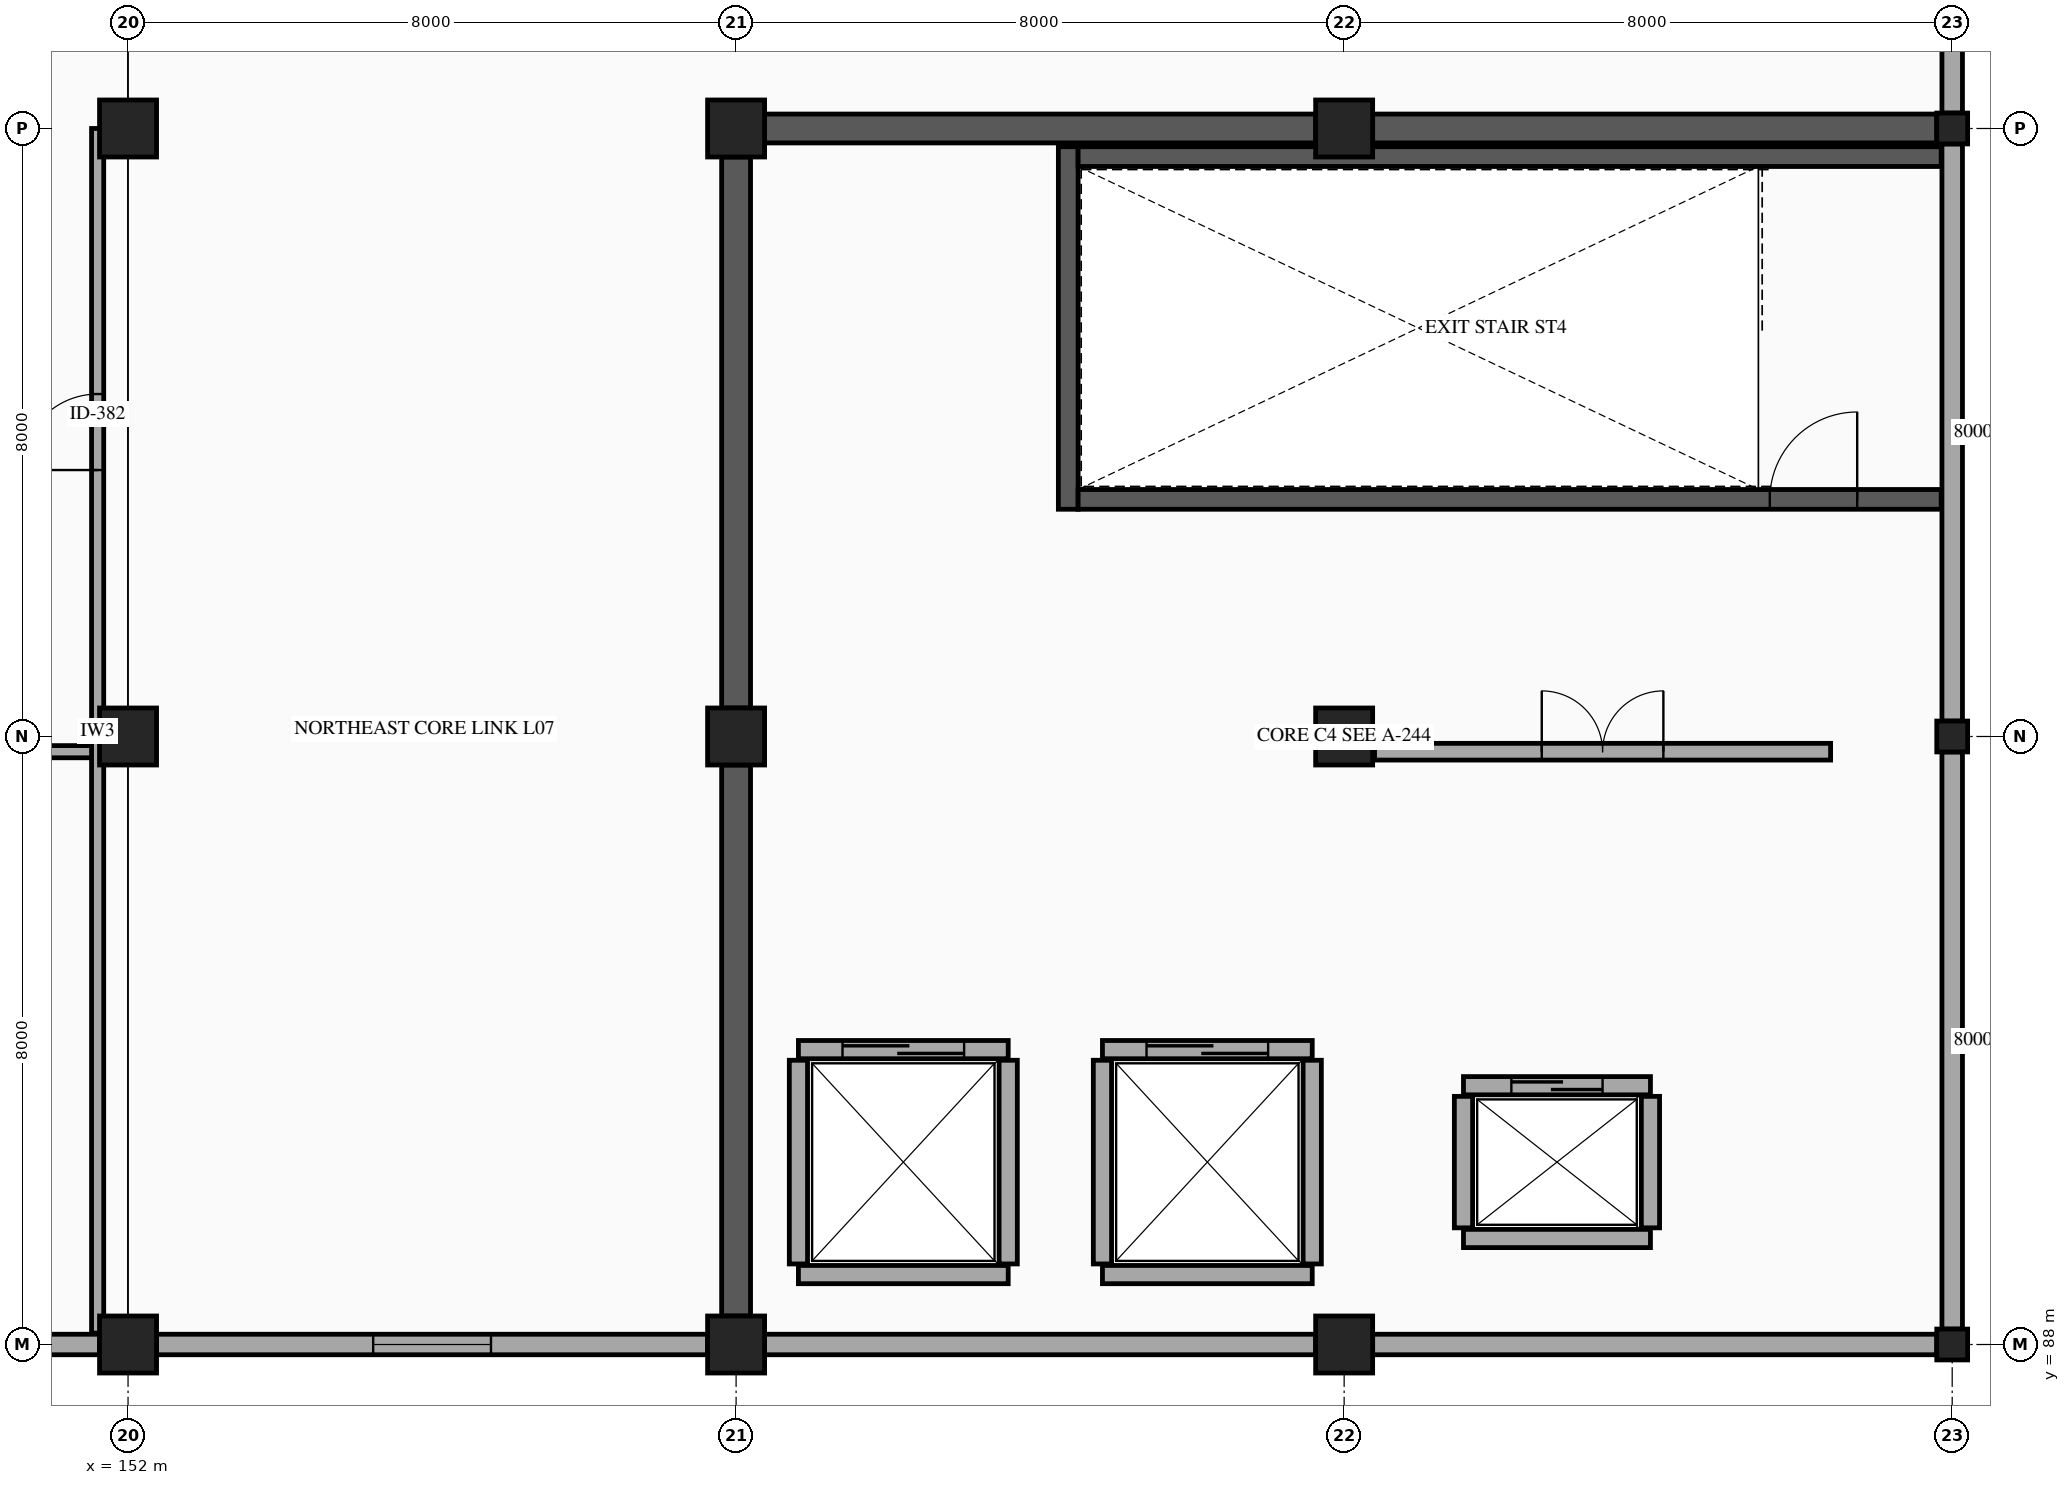
"""IFC4 building model, lengths in metres.
Left out: names, types, materials, properties, quantities, classifications, styles, units other than length and angle.
Written with IfcOpenShell. Run it as: python <this file> out.ifc"""

import sys

from ifc_helpers import new_model, si_unit, direction, frame, frame_2d, origin, origin_2d, place, context, subcontext, project, spatial, rectangle, hollow_rectangle, extrude, element, fill, save


model = new_model("IFC4")
c1 = context("Model", 3, precision=1e-05, world=origin(), true_north=direction((0.0, 1.0)))
c2 = subcontext(c1, "Body", "Model", "MODEL_VIEW")
j1 = project(units=[si_unit("LENGTHUNIT", "METRE"), si_unit("PLANEANGLEUNIT", "RADIAN")], contexts=[c1])
p1 = place(None, origin())
s1 = spatial("IfcSite", under=j1, at=p1, CompositionType="ELEMENT")
p2 = place(p1, origin())
s2 = spatial("IfcBuilding", under=s1, at=p2, CompositionType="ELEMENT")
p3 = place(p2, frame((0.0, 0.0, 32.9)))
s3 = spatial("IfcBuildingStorey", under=s2, at=p3, CompositionType="ELEMENT", Elevation=32.9)
for number, where, z_axis, x_axis in (
    (1, (152.0, 88.0, 0.0), (0.0, 0.0, 1.0), (1.0, 0.0, 0.0)),
    (2, (152.0, 96.0, 0.0), (0.0, 0.0, 1.0), (1.0, 0.0, 0.0)),
    (3, (152.0, 104.0, 0.0), (0.0, 0.0, 1.0), (1.0, 0.0, 0.0)),
    (4, (160.0, 88.0, 0.0), (0.0, 0.0, 1.0), (1.0, 0.0, 0.0)),
    (5, (160.0, 96.0, 0.0), (0.0, 0.0, 1.0), (1.0, 0.0, 0.0)),
    (6, (160.0, 104.0, 0.0), (0.0, 0.0, 1.0), (1.0, 0.0, 0.0)),
    (7, (168.0, 88.0, 0.0), (0.0, 0.0, 1.0), (1.0, 0.0, 0.0)),
    (8, (168.0, 96.0, 0.0), (0.0, 0.0, 1.0), (1.0, 0.0, 0.0)),
    (9, (168.0, 104.0, 0.0), (0.0, 0.0, 1.0), (1.0, 0.0, 0.0)),
):
    element("IfcColumn", number, at=place(p3, frame(where, z_axis=z_axis, x_axis=x_axis)), inside=s3, PredefinedType="COLUMN", context=c2, shape_type="SweptSolid", body=[
        extrude(rectangle(XDim=0.75, YDim=0.75, at=origin_2d()), origin(), (0.0, 0.0, 1.0), 4.6),
    ])
for number, where, z_axis, x_axis in (
    (10, (176.0, 88.0, 0.0), (0.0, 0.0, 1.0), (1.0, 0.0, 0.0)),
    (11, (176.0, 96.0, 0.0), (0.0, 0.0, 1.0), (1.0, 0.0, 0.0)),
    (12, (176.0, 104.0, 0.0), (0.0, 0.0, 1.0), (1.0, 0.0, 0.0)),
):
    element("IfcColumn", number, at=place(p3, frame(where, z_axis=z_axis, x_axis=x_axis)), inside=s3, PredefinedType="COLUMN", context=c2, shape_type="SweptSolid", body=[
        extrude(hollow_rectangle(XDim=0.406, YDim=0.406, WallThickness=0.015, InnerFilletRadius=0.015, OuterFilletRadius=0.029, at=origin_2d()), origin(), (0.0, 0.0, 1.0), 4.6),
    ])
for number, where, z_axis, x_axis in (
    (13, (176.0, 111.797, 0.0), (0.0, 0.0, 1.0), (0.0, -1.0, 0.0)),
    (14, (176.0, 103.797, 0.0), (0.0, 0.0, 1.0), (0.0, -1.0, 0.0)),
    (15, (176.0, 95.797, 0.0), (0.0, 0.0, 1.0), (0.0, -1.0, 0.0)),
):
    element("IfcWall", number, at=place(p3, frame(where, z_axis=z_axis, x_axis=x_axis)), inside=s3, PredefinedType="STANDARD", context=c2, shape_type="SweptSolid", body=[
        extrude(rectangle(XDim=7.594, YDim=0.27, at=frame_2d((3.797, 0.0))), origin(), (0.0, 0.0, 1.0), 3.58),
    ])
p4 = place(p3, frame((175.797, 88.0, 0.0), z_axis=(0.0, 0.0, 1.0), x_axis=(-1.0, 0.0, 0.0)))
e16 = element("IfcWall", 16, at=p4, inside=s3, PredefinedType="STANDARD", context=c2, shape_type="SweptSolid", body=[
    extrude(rectangle(XDim=7.422, YDim=0.27, at=frame_2d((3.711, 0.0))), origin(), (0.0, 0.0, 1.0), 3.58),
])
p5 = place(p3, frame((167.625, 88.0, 0.0), z_axis=(0.0, 0.0, 1.0), x_axis=(-1.0, 0.0, 0.0)))
e17 = element("IfcWall", 17, at=p5, inside=s3, PredefinedType="STANDARD", context=c2, shape_type="SweptSolid", body=[
    extrude(rectangle(XDim=7.25, YDim=0.27, at=frame_2d((3.625, 0.0))), origin(), (0.0, 0.0, 1.0), 3.58),
])
p6 = place(p3, frame((159.625, 88.0, 0.0), z_axis=(0.0, 0.0, 1.0), x_axis=(-1.0, 0.0, 0.0)))
e18 = element("IfcWall", 18, at=p6, inside=s3, PredefinedType="STANDARD", context=c2, shape_type="SweptSolid", body=[
    extrude(rectangle(XDim=7.25, YDim=0.27, at=frame_2d((3.625, 0.0))), origin(), (0.0, 0.0, 1.0), 3.58),
])
p7 = place(p6, frame((2.85, 0.0, 0.8)))
e19 = element("IfcOpeningElement", 19, at=p7, cuts=e18, PredefinedType="OPENING", context=c2, shape_type="SweptSolid", body=[
    extrude(rectangle(XDim=1.55, YDim=1.4, at=frame_2d((0.775, 0.7))), frame((0.0, 0.145, 0.0), z_axis=(0.0, -1.0, 0.0), x_axis=(1.0, 0.0, 0.0)), (0.0, 0.0, 1.0), 0.29),
])
p8 = place(p3, frame((151.625, 88.0, 0.0), z_axis=(0.0, 0.0, 1.0), x_axis=(-1.0, 0.0, 0.0)))
e20 = element("IfcWall", 20, at=p8, inside=s3, PredefinedType="STANDARD", context=c2, shape_type="SweptSolid", body=[
    extrude(rectangle(XDim=7.422, YDim=0.27, at=frame_2d((3.711, 0.0))), origin(), (0.0, 0.0, 1.0), 3.58),
])
p9 = place(p3, frame((164.37, 98.99, 0.0), z_axis=(0.0, 0.0, 1.0), x_axis=(0.0, 1.0, 0.0)))
e21 = element("IfcWall", 21, at=p9, inside=s3, PredefinedType="SHEAR", context=c2, shape_type="SweptSolid", body=[
    extrude(rectangle(XDim=4.77, YDim=0.26, at=frame_2d((2.385, 0.0))), origin(), (0.0, 0.0, 1.0), 4.38),
])
p10 = place(p3, frame((164.5, 99.12, 0.0), z_axis=(0.0, 0.0, 1.0), x_axis=(1.0, 0.0, 0.0)))
e22 = element("IfcWall", 22, at=p10, inside=s3, PredefinedType="SHEAR", context=c2, shape_type="SweptSolid", body=[
    extrude(rectangle(XDim=11.355, YDim=0.26, at=frame_2d((5.677, 0.0))), origin(), (0.0, 0.0, 1.0), 4.38),
])
p11 = place(p10, frame((9.1, 0.0, 0.0)))
e23 = element("IfcOpeningElement", 23, at=p11, cuts=e22, PredefinedType="OPENING", context=c2, shape_type="SweptSolid", body=[
    extrude(rectangle(XDim=1.15, YDim=2.15, at=frame_2d((0.575, 1.075))), frame((0.0, 0.14, 0.0), z_axis=(0.0, -1.0, 0.0), x_axis=(1.0, 0.0, 0.0)), (0.0, 0.0, 1.0), 0.28),
])
p12 = place(p3, frame((164.5, 103.63, 0.0), z_axis=(0.0, 0.0, 1.0), x_axis=(1.0, 0.0, 0.0)))
e24 = element("IfcWall", 24, at=p12, inside=s3, PredefinedType="SHEAR", context=c2, shape_type="SweptSolid", body=[
    extrude(rectangle(XDim=11.355, YDim=0.26, at=frame_2d((5.677, 0.0))), origin(), (0.0, 0.0, 1.0), 4.38),
])
p13 = place(p3, frame((160.375, 104.0, 0.0), z_axis=(0.0, 0.0, 1.0), x_axis=(1.0, 0.0, 0.0)))
e25 = element("IfcWall", 25, at=p13, inside=s3, PredefinedType="SHEAR", context=c2, shape_type="SweptSolid", body=[
    extrude(rectangle(XDim=7.25, YDim=0.38, at=frame_2d((3.625, 0.0))), origin(), (0.0, 0.0, 1.0), 4.38),
])
p14 = place(p3, frame((168.375, 104.0, 0.0), z_axis=(0.0, 0.0, 1.0), x_axis=(1.0, 0.0, 0.0)))
e26 = element("IfcWall", 26, at=p14, inside=s3, PredefinedType="SHEAR", context=c2, shape_type="SweptSolid", body=[
    extrude(rectangle(XDim=7.422, YDim=0.38, at=frame_2d((3.711, 0.0))), origin(), (0.0, 0.0, 1.0), 4.38),
])
for number, where, z_axis, x_axis in (
    (27, (160.0, 88.375, 0.0), (0.0, 0.0, 1.0), (0.0, 1.0, 0.0)),
    (28, (160.0, 96.375, 0.0), (0.0, 0.0, 1.0), (0.0, 1.0, 0.0)),
):
    element("IfcWall", number, at=place(p3, frame(where, z_axis=z_axis, x_axis=x_axis)), inside=s3, PredefinedType="SHEAR", context=c2, shape_type="SweptSolid", body=[
        extrude(rectangle(XDim=7.25, YDim=0.38, at=frame_2d((3.625, 0.0))), origin(), (0.0, 0.0, 1.0), 4.38),
    ])
p15 = place(p3, frame((169.57, 91.405, 0.0), z_axis=(0.0, 0.0, 1.0), x_axis=(1.0, 0.0, 0.0)))
e29 = element("IfcWall", 29, at=p15, inside=s3, PredefinedType="PARTITIONING", context=c2, shape_type="SweptSolid", body=[
    extrude(rectangle(XDim=2.46, YDim=0.24, at=frame_2d((1.23, 0.0))), origin(), (0.0, 0.0, 1.0), 4.38),
])
p16 = place(p15, frame((0.63, 0.0, 0.0)))
e30 = element("IfcOpeningElement", 30, at=p16, cuts=e29, PredefinedType="OPENING", context=c2, shape_type="SweptSolid", body=[
    extrude(rectangle(XDim=1.2, YDim=2.15, at=frame_2d((0.6, 1.075))), frame((0.0, 0.13, 0.0), z_axis=(0.0, -1.0, 0.0), x_axis=(1.0, 0.0, 0.0)), (0.0, 0.0, 1.0), 0.26),
])
p17 = place(p3, frame((169.57, 89.395, 0.0), z_axis=(0.0, 0.0, 1.0), x_axis=(1.0, 0.0, 0.0)))
e31 = element("IfcWall", 31, at=p17, inside=s3, PredefinedType="PARTITIONING", context=c2, shape_type="SweptSolid", body=[
    extrude(rectangle(XDim=2.46, YDim=0.24, at=frame_2d((1.23, 0.0))), origin(), (0.0, 0.0, 1.0), 4.38),
])
for number, where, z_axis, x_axis in (
    (32, (169.57, 89.535, 0.0), (0.0, 0.0, 1.0), (0.0, 1.0, 0.0)),
    (33, (172.03, 89.535, 0.0), (0.0, 0.0, 1.0), (0.0, 1.0, 0.0)),
):
    element("IfcWall", number, at=place(p3, frame(where, z_axis=z_axis, x_axis=x_axis)), inside=s3, PredefinedType="PARTITIONING", context=c2, shape_type="SweptSolid", body=[
        extrude(rectangle(XDim=1.73, YDim=0.24, at=frame_2d((0.865, 0.0))), origin(), (0.0, 0.0, 1.0), 4.38),
    ])
p18 = place(p3, frame((164.82, 91.88, 0.0), z_axis=(0.0, 0.0, 1.0), x_axis=(1.0, 0.0, 0.0)))
e34 = element("IfcWall", 34, at=p18, inside=s3, PredefinedType="PARTITIONING", context=c2, shape_type="SweptSolid", body=[
    extrude(rectangle(XDim=2.76, YDim=0.24, at=frame_2d((1.38, 0.0))), origin(), (0.0, 0.0, 1.0), 4.38),
])
p19 = place(p18, frame((0.58, 0.0, 0.0)))
e35 = element("IfcOpeningElement", 35, at=p19, cuts=e34, PredefinedType="OPENING", context=c2, shape_type="SweptSolid", body=[
    extrude(rectangle(XDim=1.6, YDim=2.3, at=frame_2d((0.8, 1.15))), frame((0.0, 0.13, 0.0), z_axis=(0.0, -1.0, 0.0), x_axis=(1.0, 0.0, 0.0)), (0.0, 0.0, 1.0), 0.26),
])
p20 = place(p3, frame((164.82, 88.92, 0.0), z_axis=(0.0, 0.0, 1.0), x_axis=(1.0, 0.0, 0.0)))
e36 = element("IfcWall", 36, at=p20, inside=s3, PredefinedType="PARTITIONING", context=c2, shape_type="SweptSolid", body=[
    extrude(rectangle(XDim=2.76, YDim=0.24, at=frame_2d((1.38, 0.0))), origin(), (0.0, 0.0, 1.0), 4.38),
])
for number, where, z_axis, x_axis in (
    (37, (164.82, 89.06, 0.0), (0.0, 0.0, 1.0), (0.0, 1.0, 0.0)),
    (38, (167.58, 89.06, 0.0), (0.0, 0.0, 1.0), (0.0, 1.0, 0.0)),
):
    element("IfcWall", number, at=place(p3, frame(where, z_axis=z_axis, x_axis=x_axis)), inside=s3, PredefinedType="PARTITIONING", context=c2, shape_type="SweptSolid", body=[
        extrude(rectangle(XDim=2.68, YDim=0.24, at=frame_2d((1.34, 0.0))), origin(), (0.0, 0.0, 1.0), 4.38),
    ])
p21 = place(p3, frame((160.82, 91.88, 0.0), z_axis=(0.0, 0.0, 1.0), x_axis=(1.0, 0.0, 0.0)))
e39 = element("IfcWall", 39, at=p21, inside=s3, PredefinedType="PARTITIONING", context=c2, shape_type="SweptSolid", body=[
    extrude(rectangle(XDim=2.76, YDim=0.24, at=frame_2d((1.38, 0.0))), origin(), (0.0, 0.0, 1.0), 4.38),
])
p22 = place(p21, frame((0.58, 0.0, 0.0)))
e40 = element("IfcOpeningElement", 40, at=p22, cuts=e39, PredefinedType="OPENING", context=c2, shape_type="SweptSolid", body=[
    extrude(rectangle(XDim=1.6, YDim=2.3, at=frame_2d((0.8, 1.15))), frame((0.0, 0.13, 0.0), z_axis=(0.0, -1.0, 0.0), x_axis=(1.0, 0.0, 0.0)), (0.0, 0.0, 1.0), 0.26),
])
p23 = place(p3, frame((160.82, 88.92, 0.0), z_axis=(0.0, 0.0, 1.0), x_axis=(1.0, 0.0, 0.0)))
e41 = element("IfcWall", 41, at=p23, inside=s3, PredefinedType="PARTITIONING", context=c2, shape_type="SweptSolid", body=[
    extrude(rectangle(XDim=2.76, YDim=0.24, at=frame_2d((1.38, 0.0))), origin(), (0.0, 0.0, 1.0), 4.38),
])
for number, where, z_axis, x_axis in (
    (42, (160.82, 89.06, 0.0), (0.0, 0.0, 1.0), (0.0, 1.0, 0.0)),
    (43, (163.58, 89.06, 0.0), (0.0, 0.0, 1.0), (0.0, 1.0, 0.0)),
):
    element("IfcWall", number, at=place(p3, frame(where, z_axis=z_axis, x_axis=x_axis)), inside=s3, PredefinedType="PARTITIONING", context=c2, shape_type="SweptSolid", body=[
        extrude(rectangle(XDim=2.68, YDim=0.24, at=frame_2d((1.34, 0.0))), origin(), (0.0, 0.0, 1.0), 4.38),
    ])
p24 = place(p3, frame((168.4, 95.8, 0.0), z_axis=(0.0, 0.0, 1.0), x_axis=(1.0, 0.0, 0.0)))
e44 = element("IfcWall", 44, at=p24, inside=s3, PredefinedType="PARTITIONING", context=c2, shape_type="SweptSolid", body=[
    extrude(rectangle(XDim=6.0, YDim=0.22, at=frame_2d((3.0, 0.0))), origin(), (0.0, 0.0, 1.0), 3.58),
])
p25 = place(p24, frame((2.2, 0.0, 0.0)))
e45 = element("IfcOpeningElement", 45, at=p25, cuts=e44, PredefinedType="OPENING", context=c2, shape_type="SweptSolid", body=[
    extrude(rectangle(XDim=1.6, YDim=2.15, at=frame_2d((0.8, 1.075))), frame((0.0, 0.12, 0.0), z_axis=(0.0, -1.0, 0.0), x_axis=(1.0, 0.0, 0.0)), (0.0, 0.0, 1.0), 0.24),
])
p26 = place(p3, frame((147.9, 95.8, 0.0), z_axis=(0.0, 0.0, 1.0), x_axis=(1.0, 0.0, 0.0)))
e46 = element("IfcWall", 46, at=p26, inside=s3, PredefinedType="PARTITIONING", context=c2, shape_type="SweptSolid", body=[
    extrude(rectangle(XDim=3.7, YDim=0.16, at=frame_2d((1.85, 0.0))), origin(), (0.0, 0.0, 1.0), 3.58),
])
p27 = place(p26, frame((0.548, 0.0, 0.0)))
e47 = element("IfcOpeningElement", 47, at=p27, cuts=e46, PredefinedType="OPENING", context=c2, shape_type="SweptSolid", body=[
    extrude(rectangle(XDim=1.02, YDim=2.1, at=frame_2d((0.51, 1.05))), frame((0.0, 0.09, 0.0), z_axis=(0.0, -1.0, 0.0), x_axis=(1.0, 0.0, 0.0)), (0.0, 0.0, 1.0), 0.18),
])
p28 = place(p3, frame((151.6, 88.15, 0.0), z_axis=(0.0, 0.0, 1.0), x_axis=(0.0, 1.0, 0.0)))
e48 = element("IfcWall", 48, at=p28, inside=s3, PredefinedType="PARTITIONING", context=c2, shape_type="SweptSolid", body=[
    extrude(rectangle(XDim=15.85, YDim=0.16, at=frame_2d((7.925, 0.0))), origin(), (0.0, 0.0, 1.0), 3.58),
])
p29 = place(p28, frame((11.356, 0.0, 0.0)))
e49 = element("IfcOpeningElement", 49, at=p29, cuts=e48, PredefinedType="OPENING", context=c2, shape_type="SweptSolid", body=[
    extrude(rectangle(XDim=1.0, YDim=2.15, at=frame_2d((0.5, 1.075))), frame((0.0, 0.09, 0.0), z_axis=(0.0, -1.0, 0.0), x_axis=(1.0, 0.0, 0.0)), (0.0, 0.0, 1.0), 0.18),
])
p30 = place(p7, origin())
e50 = element("IfcWindow", 50, at=p30, inside=s3, PartitioningType="SINGLE_PANEL", PredefinedType="WINDOW", context=c2, shape_type="SweptSolid", body=[
    extrude(rectangle(XDim=1.55, YDim=1.4, at=frame_2d((0.775, 0.7))), frame((0.0, 0.03, 0.0), z_axis=(0.0, -1.0, 0.0), x_axis=(1.0, 0.0, 0.0)), (0.0, 0.0, 1.0), 0.06),
])
fill(e19, e50)
p31 = place(p11, origin())
e51 = element("IfcDoor", 51, at=p31, inside=s3, OperationType="SINGLE_SWING_RIGHT", PredefinedType="DOOR", context=c2, shape_type="SweptSolid", body=[
    extrude(rectangle(XDim=1.15, YDim=2.15, at=frame_2d((0.575, 1.075))), frame((0.0, 0.025, 0.0), z_axis=(0.0, -1.0, 0.0), x_axis=(1.0, 0.0, 0.0)), (0.0, 0.0, 1.0), 0.05),
])
fill(e23, e51)
p32 = place(p16, origin())
e52 = element("IfcDoor", 52, at=p32, inside=s3, OperationType="SLIDING_TO_LEFT", PredefinedType="DOOR", context=c2, shape_type="SweptSolid", body=[
    extrude(rectangle(XDim=1.2, YDim=2.15, at=frame_2d((0.6, 1.075))), frame((0.0, 0.025, 0.0), z_axis=(0.0, -1.0, 0.0), x_axis=(1.0, 0.0, 0.0)), (0.0, 0.0, 1.0), 0.05),
])
fill(e30, e52)
p33 = place(p19, origin())
e53 = element("IfcDoor", 53, at=p33, inside=s3, OperationType="SLIDING_TO_LEFT", PredefinedType="DOOR", context=c2, shape_type="SweptSolid", body=[
    extrude(rectangle(XDim=1.6, YDim=2.3, at=frame_2d((0.8, 1.15))), frame((0.0, 0.025, 0.0), z_axis=(0.0, -1.0, 0.0), x_axis=(1.0, 0.0, 0.0)), (0.0, 0.0, 1.0), 0.05),
])
fill(e35, e53)
p34 = place(p22, origin())
e54 = element("IfcDoor", 54, at=p34, inside=s3, OperationType="SLIDING_TO_LEFT", PredefinedType="DOOR", context=c2, shape_type="SweptSolid", body=[
    extrude(rectangle(XDim=1.6, YDim=2.3, at=frame_2d((0.8, 1.15))), frame((0.0, 0.025, 0.0), z_axis=(0.0, -1.0, 0.0), x_axis=(1.0, 0.0, 0.0)), (0.0, 0.0, 1.0), 0.05),
])
fill(e40, e54)
p35 = place(p25, origin())
e55 = element("IfcDoor", 55, at=p35, inside=s3, OperationType="DOUBLE_DOOR_SINGLE_SWING", PredefinedType="DOOR", context=c2, shape_type="SweptSolid", body=[
    extrude(rectangle(XDim=1.6, YDim=2.15, at=frame_2d((0.8, 1.075))), frame((0.0, 0.025, 0.0), z_axis=(0.0, -1.0, 0.0), x_axis=(1.0, 0.0, 0.0)), (0.0, 0.0, 1.0), 0.05),
])
fill(e45, e55)
p36 = place(p29, origin())
e56 = element("IfcDoor", 56, at=p36, inside=s3, OperationType="SINGLE_SWING_LEFT", PredefinedType="DOOR", context=c2, shape_type="SweptSolid", body=[
    extrude(rectangle(XDim=1.0, YDim=2.15, at=frame_2d((0.5, 1.075))), frame((0.0, 0.025, 0.0), z_axis=(0.0, -1.0, 0.0), x_axis=(1.0, 0.0, 0.0)), (0.0, 0.0, 1.0), 0.05),
])
fill(e49, e56)
save(model, sys.argv[1])
